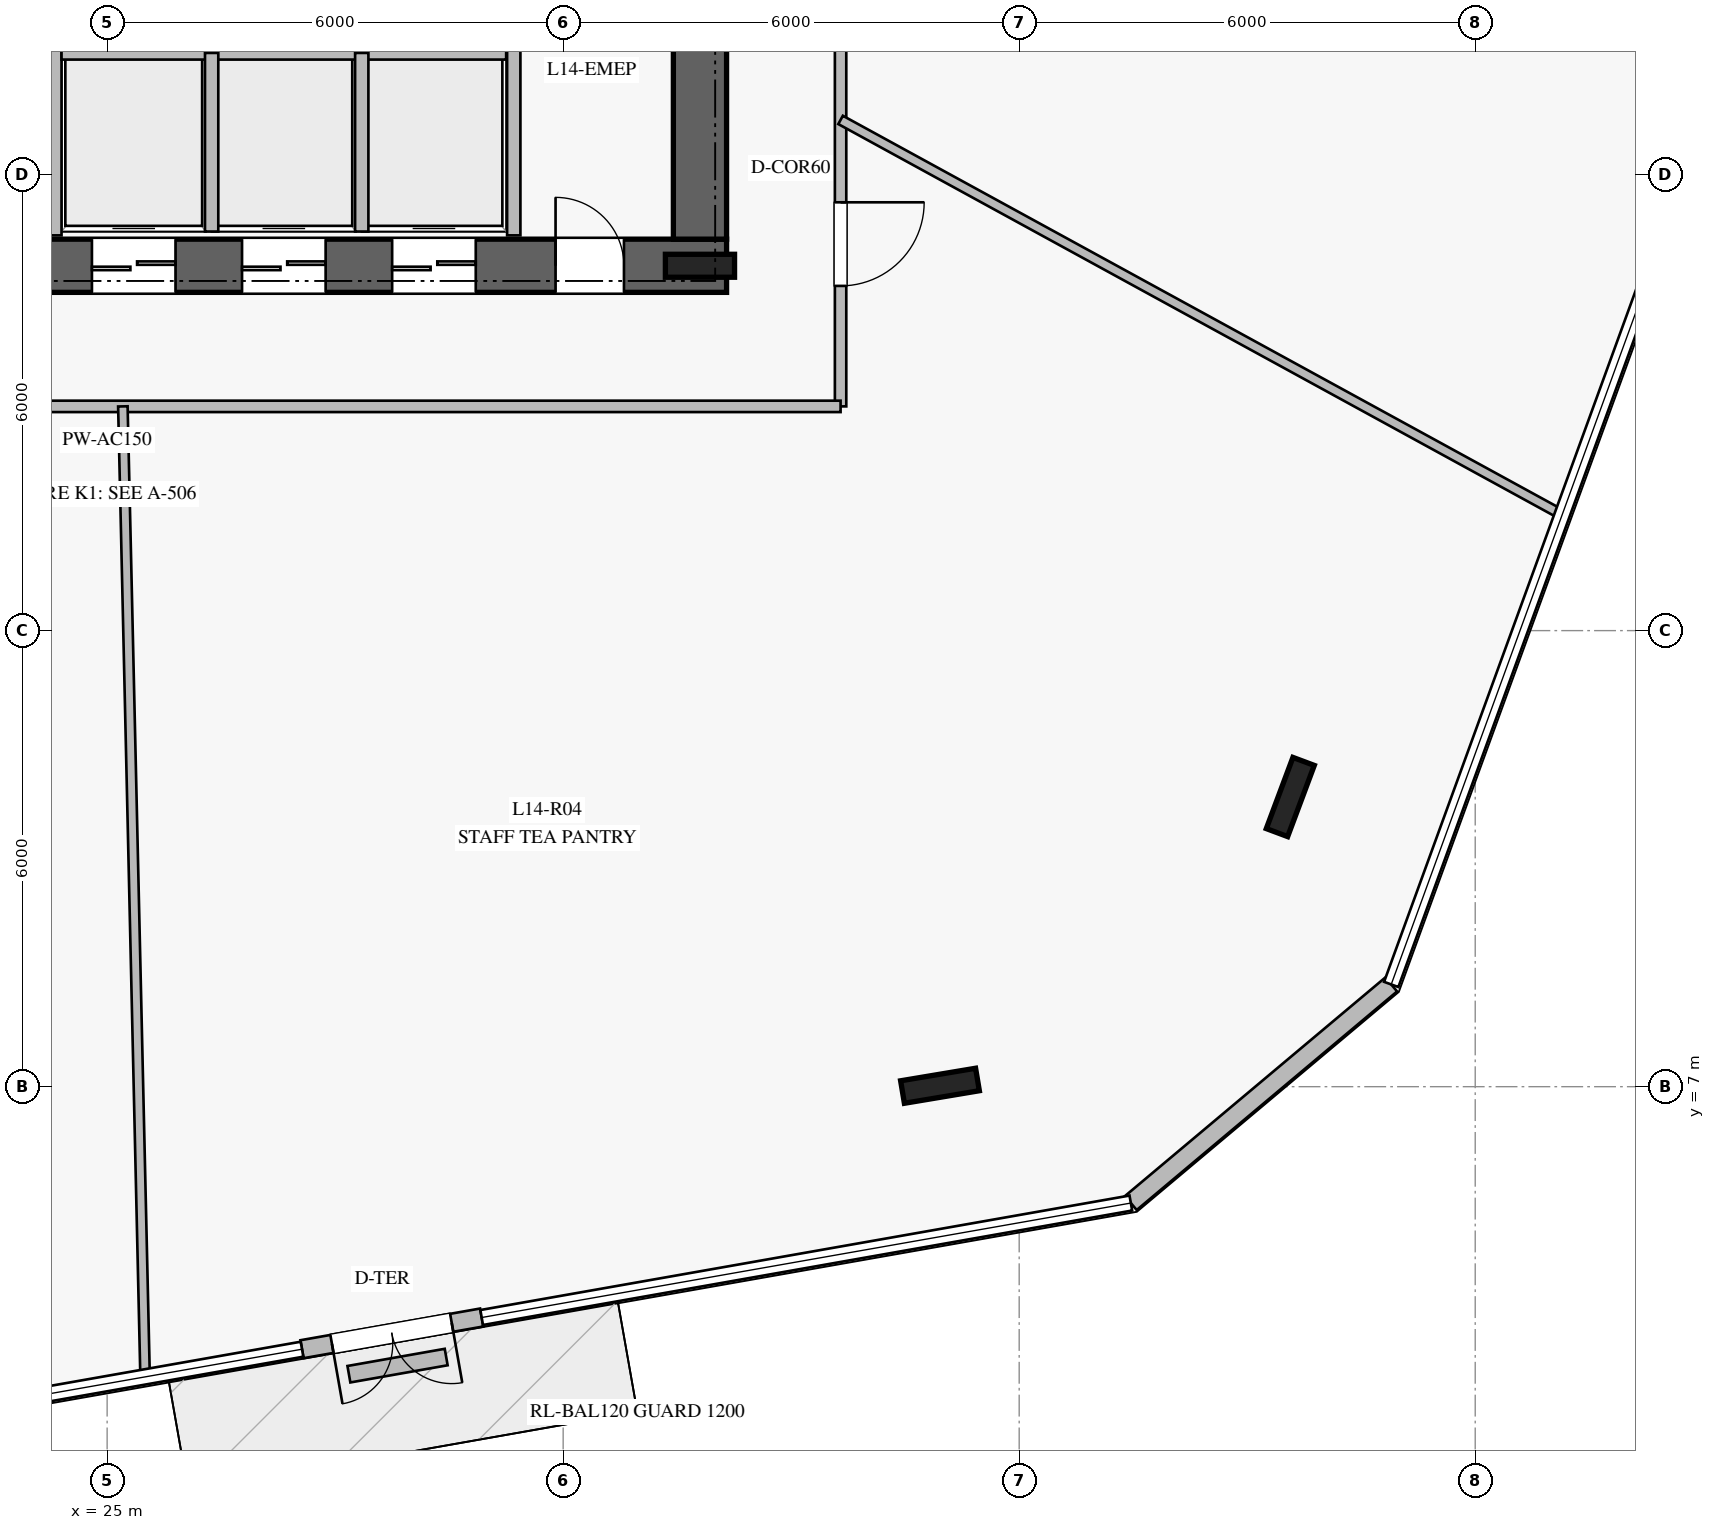
"""IFC4 building model, lengths in metres.
Left out: names, types, materials, properties, quantities, classifications, styles, units other than length and angle.
Written with IfcOpenShell. Run it as: python <this file> out.ifc"""

import sys

from ifc_helpers import new_model, si_unit, direction, frame, frame_2d, origin, origin_2d, place, context, subcontext, project, spatial, rectangle, i_section, extrude, element, fill, save


model = new_model("IFC4")
c1 = context("Model", 3, precision=1e-05, world=origin(), true_north=direction((0.0, 1.0)))
c2 = subcontext(c1, "Body", "Model", "MODEL_VIEW")
j1 = project(units=[si_unit("LENGTHUNIT", "METRE"), si_unit("PLANEANGLEUNIT", "RADIAN")], contexts=[c1])
p1 = place(None, origin())
s1 = spatial("IfcSite", under=j1, at=p1, CompositionType="ELEMENT")
p2 = place(p1, origin())
s2 = spatial("IfcBuilding", under=s1, at=p2, CompositionType="ELEMENT")
p3 = place(p2, frame((0.0, 0.0, 60.0)))
s3 = spatial("IfcBuildingStorey", under=s2, at=p3, CompositionType="ELEMENT", Elevation=60.0)
p4 = place(p3, frame((16.85, 17.8, 0.0), z_axis=(0.0, 0.0, 1.0), x_axis=(1.0, 0.0, 0.0)))
e1 = element("IfcWall", 1, at=p4, inside=s3, PredefinedType="SHEAR", context=c2, shape_type="SweptSolid", body=[
    extrude(rectangle(XDim=16.3, YDim=0.7, at=frame_2d((8.15, 0.0))), origin(), (0.0, 0.0, 1.0), 3.76),
])
p5 = place(p4, frame((5.1, 0.0, 0.0)))
e2 = element("IfcOpeningElement", 2, at=p5, cuts=e1, PredefinedType="OPENING", context=c2, shape_type="SweptSolid", body=[
    extrude(rectangle(XDim=1.2, YDim=2.25, at=frame_2d((0.6, 1.125))), frame((0.0, 0.36, 0.0), z_axis=(0.0, -1.0, 0.0), x_axis=(1.0, 0.0, 0.0)), (0.0, 0.0, 1.0), 0.72),
])
p6 = place(p4, frame((14.05, 0.0, 0.0)))
e3 = element("IfcOpeningElement", 3, at=p6, cuts=e1, PredefinedType="OPENING", context=c2, shape_type="SweptSolid", body=[
    extrude(rectangle(XDim=0.9, YDim=2.1, at=frame_2d((0.45, 1.05))), frame((0.0, 0.36, 0.0), z_axis=(0.0, -1.0, 0.0), x_axis=(1.0, 0.0, 0.0)), (0.0, 0.0, 1.0), 0.72),
])
p7 = place(p4, frame((7.95, 0.0, 0.0)))
e4 = element("IfcOpeningElement", 4, at=p7, cuts=e1, PredefinedType="OPENING", context=c2, shape_type="SweptSolid", body=[
    extrude(rectangle(XDim=1.1, YDim=2.2, at=frame_2d((0.55, 1.1))), frame((0.0, 0.36, 0.0), z_axis=(0.0, -1.0, 0.0), x_axis=(1.0, 0.0, 0.0)), (0.0, 0.0, 1.0), 0.72),
])
p8 = place(p4, frame((9.925, 0.0, 0.0)))
e5 = element("IfcOpeningElement", 5, at=p8, cuts=e1, PredefinedType="OPENING", context=c2, shape_type="SweptSolid", body=[
    extrude(rectangle(XDim=1.1, YDim=2.2, at=frame_2d((0.55, 1.1))), frame((0.0, 0.36, 0.0), z_axis=(0.0, -1.0, 0.0), x_axis=(1.0, 0.0, 0.0)), (0.0, 0.0, 1.0), 0.72),
])
p9 = place(p4, frame((11.9, 0.0, 0.0)))
e6 = element("IfcOpeningElement", 6, at=p9, cuts=e1, PredefinedType="OPENING", context=c2, shape_type="SweptSolid", body=[
    extrude(rectangle(XDim=1.1, YDim=2.2, at=frame_2d((0.55, 1.1))), frame((0.0, 0.36, 0.0), z_axis=(0.0, -1.0, 0.0), x_axis=(1.0, 0.0, 0.0)), (0.0, 0.0, 1.0), 0.72),
])
p10 = place(p3, frame((32.8, 18.15, 0.0), z_axis=(0.0, 0.0, 1.0), x_axis=(0.0, 1.0, 0.0)))
e7 = element("IfcWall", 7, at=p10, inside=s3, PredefinedType="SHEAR", context=c2, shape_type="SweptSolid", body=[
    extrude(rectangle(XDim=13.7, YDim=0.7, at=frame_2d((6.85, 0.0))), origin(), (0.0, 0.0, 1.0), 3.76),
])
p11 = place(p3, frame((32.8, 17.8, 0.0), z_axis=(0.0, 0.0, 1.0), x_axis=(1.0, 0.0, 0.0)))
e8 = element("IfcColumn", 8, at=p11, inside=s3, PredefinedType="COLUMN", context=c2, shape_type="SweptSolid", body=[
    extrude(i_section(OverallWidth=0.302, OverallDepth=0.91, WebThickness=0.021, FlangeThickness=0.04, at=origin_2d()), origin(), (0.0, 0.0, 1.0), 4.0),
])
for number, where, z_axis, x_axis in (
    (9, (35.958, 7.012, 0.0), (0.0, 0.0, 1.0), (0.986, 0.165, 0.0)),
    (10, (40.567, 10.811, 0.0), (0.0, 0.0, 1.0), (0.35, 0.937, 0.0)),
):
    element("IfcColumn", number, at=place(p3, frame(where, z_axis=z_axis, x_axis=x_axis)), inside=s3, PredefinedType="COLUMN", context=c2, shape_type="SweptSolid", body=[
        extrude(i_section(OverallWidth=0.3, OverallDepth=1.0, WebThickness=0.019, FlangeThickness=0.036, at=origin_2d()), origin(), (0.0, 0.0, 1.0), 4.0),
    ])
p12 = place(p3, frame((27.564, 3.546, 0.0), z_axis=(0.0, 0.0, 1.0), x_axis=(0.984796866145, 0.173709908848, 0.0)))
e11 = element("IfcWall", 11, at=p12, inside=s3, PredefinedType="STANDARD", context=c2, shape_type="SweptSolid", body=[
    extrude(rectangle(XDim=2.4, YDim=0.24, at=frame_2d((1.2, 0.0))), origin(), (0.0, 0.0, 1.0), 3.76),
])
p13 = place(p12, frame((0.4, 0.0, 0.0)))
e12 = element("IfcOpeningElement", 12, at=p13, cuts=e11, PredefinedType="OPENING", context=c2, shape_type="SweptSolid", body=[
    extrude(rectangle(XDim=1.6, YDim=2.25, at=frame_2d((0.8, 1.125))), frame((0.0, 0.13, 0.0), z_axis=(0.0, -1.0, 0.0), x_axis=(1.0, 0.0, 0.0)), (0.0, 0.0, 1.0), 0.26),
])
p14 = place(p3, frame((38.469, 5.469, 0.0), z_axis=(0.0, 0.0, 1.0), x_axis=(0.765912339195, 0.642945012166, 0.0)))
e13 = element("IfcWall", 13, at=p14, inside=s3, PredefinedType="STANDARD", context=c2, shape_type="SweptSolid", body=[
    extrude(rectangle(XDim=4.473, YDim=0.24, at=frame_2d((2.237, 0.0))), origin(), (0.0, 0.0, 1.0), 3.76),
])
p15 = place(p3, frame((28.181, 3.217, 0.0), z_axis=(0.0, 0.0, 1.0), x_axis=(0.98475896803, 0.173924624146, 0.0)))
e14 = element("IfcWall", 14, at=p15, inside=s3, PredefinedType="USERDEFINED", context=c2, shape_type="SweptSolid", body=[
    extrude(rectangle(XDim=1.3, YDim=0.22, at=frame_2d((0.65, 0.0))), origin(), (0.0, 0.0, 1.0), 0.4),
])
p16 = place(p3, frame((24.3, 18.2, 0.0), z_axis=(0.0, 0.0, 1.0), x_axis=(0.0, 1.0, 0.0)))
e15 = element("IfcWall", 15, at=p16, inside=s3, PredefinedType="PARTITIONING", context=c2, shape_type="SweptSolid", body=[
    extrude(rectangle(XDim=5.15, YDim=0.2, at=frame_2d((2.575, 0.0))), origin(), (0.0, 0.0, 1.0), 3.76),
])
p17 = place(p3, frame((30.35, 18.2, 0.0), z_axis=(0.0, 0.0, 1.0), x_axis=(0.0, 1.0, 0.0)))
e16 = element("IfcWall", 16, at=p17, inside=s3, PredefinedType="PARTITIONING", context=c2, shape_type="SweptSolid", body=[
    extrude(rectangle(XDim=3.48, YDim=0.175, at=frame_2d((1.74, 0.0))), origin(), (0.0, 0.0, 1.0), 3.76),
])
p18 = place(p3, frame((24.4, 20.6, 0.0), z_axis=(0.0, 0.0, 1.0), x_axis=(1.0, 0.0, 0.0)))
e17 = element("IfcWall", 17, at=p18, inside=s3, PredefinedType="PARTITIONING", context=c2, shape_type="SweptSolid", body=[
    extrude(rectangle(XDim=1.9, YDim=0.175, at=frame_2d((0.95, 0.0))), origin(), (0.0, 0.0, 1.0), 3.76),
])
p19 = place(p3, frame((26.375, 20.6, 0.0), z_axis=(0.0, 0.0, 1.0), x_axis=(1.0, 0.0, 0.0)))
e18 = element("IfcWall", 18, at=p19, inside=s3, PredefinedType="PARTITIONING", context=c2, shape_type="SweptSolid", body=[
    extrude(rectangle(XDim=1.9, YDim=0.175, at=frame_2d((0.95, 0.0))), origin(), (0.0, 0.0, 1.0), 3.76),
])
p20 = place(p3, frame((26.375, 18.25, 0.0), z_axis=(0.0, 0.0, 1.0), x_axis=(0.0, 1.0, 0.0)))
e19 = element("IfcWall", 19, at=p20, inside=s3, PredefinedType="PARTITIONING", context=c2, shape_type="SweptSolid", body=[
    extrude(rectangle(XDim=2.35, YDim=0.175, at=frame_2d((1.175, 0.0))), origin(), (0.0, 0.0, 1.0), 3.76),
])
p21 = place(p3, frame((28.35, 20.6, 0.0), z_axis=(0.0, 0.0, 1.0), x_axis=(1.0, 0.0, 0.0)))
e20 = element("IfcWall", 20, at=p21, inside=s3, PredefinedType="PARTITIONING", context=c2, shape_type="SweptSolid", body=[
    extrude(rectangle(XDim=1.9, YDim=0.175, at=frame_2d((0.95, 0.0))), origin(), (0.0, 0.0, 1.0), 3.76),
])
p22 = place(p3, frame((28.35, 18.25, 0.0), z_axis=(0.0, 0.0, 1.0), x_axis=(0.0, 1.0, 0.0)))
e21 = element("IfcWall", 21, at=p22, inside=s3, PredefinedType="PARTITIONING", context=c2, shape_type="SweptSolid", body=[
    extrude(rectangle(XDim=2.35, YDim=0.175, at=frame_2d((1.175, 0.0))), origin(), (0.0, 0.0, 1.0), 3.76),
])
p23 = place(p3, frame((34.65, 34.05, 0.0), z_axis=(0.0, 0.0, 1.0), x_axis=(0.0, -1.0, 0.0)))
e22 = element("IfcWall", 22, at=p23, inside=s3, PredefinedType="PARTITIONING", context=c2, shape_type="SweptSolid", body=[
    extrude(rectangle(XDim=18.1, YDim=0.15, at=frame_2d((9.05, 0.0))), origin(), (0.0, 0.0, 1.0), 3.21),
])
p24 = place(p23, frame((15.415, 0.0, 0.0)))
e23 = element("IfcOpeningElement", 23, at=p24, cuts=e22, PredefinedType="OPENING", context=c2, shape_type="SweptSolid", body=[
    extrude(rectangle(XDim=1.1, YDim=2.2, at=frame_2d((0.55, 1.1))), frame((0.0, 0.085, 0.0), z_axis=(0.0, -1.0, 0.0), x_axis=(1.0, 0.0, 0.0)), (0.0, 0.0, 1.0), 0.17),
])
p25 = place(p23, frame((9.732, 0.0, 0.0)))
e24 = element("IfcOpeningElement", 24, at=p25, cuts=e22, PredefinedType="OPENING", context=c2, shape_type="SweptSolid", body=[
    extrude(rectangle(XDim=1.1, YDim=2.2, at=frame_2d((0.55, 1.1))), frame((0.0, 0.085, 0.0), z_axis=(0.0, -1.0, 0.0), x_axis=(1.0, 0.0, 0.0)), (0.0, 0.0, 1.0), 0.17),
])
p26 = place(p3, frame((34.65, 15.95, 0.0), z_axis=(0.0, 0.0, 1.0), x_axis=(-1.0, 0.0, 0.0)))
e25 = element("IfcWall", 25, at=p26, inside=s3, PredefinedType="PARTITIONING", context=c2, shape_type="SweptSolid", body=[
    extrude(rectangle(XDim=19.3, YDim=0.15, at=frame_2d((9.65, 0.0))), origin(), (0.0, 0.0, 1.0), 3.21),
])
p27 = place(p26, frame((13.547, 0.0, 0.0)))
e26 = element("IfcOpeningElement", 26, at=p27, cuts=e25, PredefinedType="OPENING", context=c2, shape_type="SweptSolid", body=[
    extrude(rectangle(XDim=1.1, YDim=2.2, at=frame_2d((0.55, 1.1))), frame((0.0, 0.085, 0.0), z_axis=(0.0, -1.0, 0.0), x_axis=(1.0, 0.0, 0.0)), (0.0, 0.0, 1.0), 0.17),
])
p28 = place(p3, frame((25.207, 15.95, 0.0), z_axis=(0.0, 0.0, 1.0), x_axis=(0.022895344846, -0.999737867235, 0.0)))
e27 = element("IfcWall", 27, at=p28, inside=s3, PredefinedType="PARTITIONING", context=c2, shape_type="SweptSolid", body=[
    extrude(rectangle(XDim=12.753, YDim=0.125, at=frame_2d((6.377, 0.0))), origin(), (0.0, 0.0, 1.0), 3.06),
])
p29 = place(p3, frame((34.65, 19.719, 0.0), z_axis=(0.0, 0.0, 1.0), x_axis=(0.877226333311, -0.480077035637, 0.0)))
e28 = element("IfcWall", 28, at=p29, inside=s3, PredefinedType="PARTITIONING", context=c2, shape_type="SweptSolid", body=[
    extrude(rectangle(XDim=10.804, YDim=0.125, at=frame_2d((5.402, 0.0))), origin(), (0.0, 0.0, 1.0), 3.05),
])
p30 = place(p13, frame((1.6, 0.0, 0.0), z_axis=(0.0, 0.0, 1.0), x_axis=(-1.0, 0.0, 0.0)))
e29 = element("IfcDoor", 29, at=p30, inside=s3, OperationType="DOUBLE_DOOR_SINGLE_SWING", PredefinedType="DOOR", context=c2, shape_type="SweptSolid", body=[
    extrude(rectangle(XDim=1.6, YDim=2.25, at=frame_2d((0.8, 1.125))), frame((0.0, 0.025, 0.0), z_axis=(0.0, -1.0, 0.0), x_axis=(1.0, 0.0, 0.0)), (0.0, 0.0, 1.0), 0.05),
])
fill(e12, e29)
p31 = place(p6, origin())
e30 = element("IfcDoor", 30, at=p31, inside=s3, OperationType="SINGLE_SWING_LEFT", PredefinedType="DOOR", context=c2, shape_type="SweptSolid", body=[
    extrude(rectangle(XDim=0.9, YDim=2.1, at=frame_2d((0.45, 1.05))), frame((0.0, 0.025, 0.0), z_axis=(0.0, -1.0, 0.0), x_axis=(1.0, 0.0, 0.0)), (0.0, 0.0, 1.0), 0.05),
])
fill(e3, e30)
p32 = place(p7, origin())
e31 = element("IfcDoor", 31, at=p32, inside=s3, OperationType="DOUBLE_DOOR_SLIDING", PredefinedType="DOOR", context=c2, shape_type="SweptSolid", body=[
    extrude(rectangle(XDim=1.1, YDim=2.2, at=frame_2d((0.55, 1.1))), frame((0.0, 0.025, 0.0), z_axis=(0.0, -1.0, 0.0), x_axis=(1.0, 0.0, 0.0)), (0.0, 0.0, 1.0), 0.05),
])
fill(e4, e31)
p33 = place(p8, origin())
e32 = element("IfcDoor", 32, at=p33, inside=s3, OperationType="DOUBLE_DOOR_SLIDING", PredefinedType="DOOR", context=c2, shape_type="SweptSolid", body=[
    extrude(rectangle(XDim=1.1, YDim=2.2, at=frame_2d((0.55, 1.1))), frame((0.0, 0.025, 0.0), z_axis=(0.0, -1.0, 0.0), x_axis=(1.0, 0.0, 0.0)), (0.0, 0.0, 1.0), 0.05),
])
fill(e5, e32)
p34 = place(p9, origin())
e33 = element("IfcDoor", 33, at=p34, inside=s3, OperationType="DOUBLE_DOOR_SLIDING", PredefinedType="DOOR", context=c2, shape_type="SweptSolid", body=[
    extrude(rectangle(XDim=1.1, YDim=2.2, at=frame_2d((0.55, 1.1))), frame((0.0, 0.025, 0.0), z_axis=(0.0, -1.0, 0.0), x_axis=(1.0, 0.0, 0.0)), (0.0, 0.0, 1.0), 0.05),
])
fill(e6, e33)
p35 = place(p24, origin())
e34 = element("IfcDoor", 34, at=p35, inside=s3, OperationType="SINGLE_SWING_LEFT", PredefinedType="DOOR", context=c2, shape_type="SweptSolid", body=[
    extrude(rectangle(XDim=1.1, YDim=2.2, at=frame_2d((0.55, 1.1))), frame((0.0, 0.025, 0.0), z_axis=(0.0, -1.0, 0.0), x_axis=(1.0, 0.0, 0.0)), (0.0, 0.0, 1.0), 0.05),
])
fill(e23, e34)
save(model, sys.argv[1])
